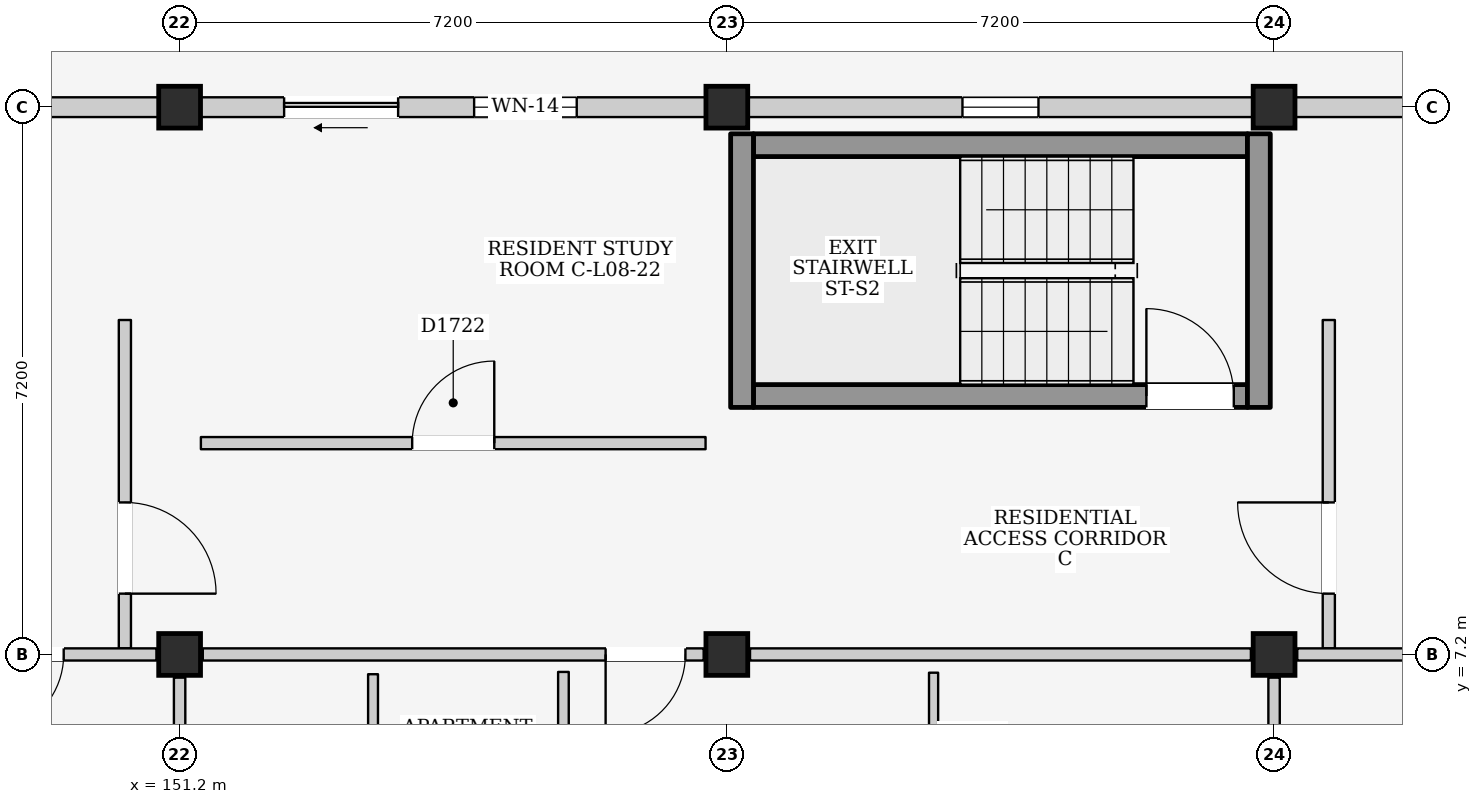
"""IFC4 building model, lengths in metres.
Left out: names, types, materials, properties, quantities, classifications, styles, units other than length and angle.
Written with IfcOpenShell. Run it as: python <this file> out.ifc"""

import sys

from ifc_helpers import new_model, si_unit, direction, frame, frame_2d, origin, origin_2d, place, context, subcontext, project, spatial, rectangle, extrude, element, fill, save


model = new_model("IFC4")
c1 = context("Model", 3, precision=1e-05, world=origin(), true_north=direction((0.0, 1.0)))
c2 = subcontext(c1, "Body", "Model", "MODEL_VIEW")
j1 = project(units=[si_unit("LENGTHUNIT", "METRE"), si_unit("PLANEANGLEUNIT", "RADIAN")], contexts=[c1])
p1 = place(None, origin())
s1 = spatial("IfcSite", under=j1, at=p1, CompositionType="ELEMENT")
p2 = place(p1, origin())
s2 = spatial("IfcBuilding", under=s1, at=p2, CompositionType="ELEMENT")
p3 = place(p2, frame((0.0, 0.0, 28.3)))
s3 = spatial("IfcBuildingStorey", under=s2, at=p3, CompositionType="ELEMENT", Elevation=28.3)
for number, where, z_axis, x_axis in (
    (1, (151.2, 7.2, 0.0), (0.0, 0.0, 1.0), (1.0, 0.0, 0.0)),
    (2, (151.2, 14.4, 0.0), (0.0, 0.0, 1.0), (1.0, 0.0, 0.0)),
    (3, (158.4, 7.2, 0.0), (0.0, 0.0, 1.0), (1.0, 0.0, 0.0)),
    (4, (158.4, 14.4, 0.0), (0.0, 0.0, 1.0), (1.0, 0.0, 0.0)),
    (5, (165.6, 7.2, 0.0), (0.0, 0.0, 1.0), (1.0, 0.0, 0.0)),
    (6, (165.6, 14.4, 0.0), (0.0, 0.0, 1.0), (1.0, 0.0, 0.0)),
):
    element("IfcColumn", number, at=place(p3, frame(where, z_axis=z_axis, x_axis=x_axis)), inside=s3, PredefinedType="COLUMN", context=c2, shape_type="SweptSolid", body=[
        extrude(rectangle(XDim=0.55, YDim=0.55, at=origin_2d()), origin(), (0.0, 0.0, 1.0), 3.2),
    ])
p4 = place(p3, frame((144.275, 14.4, 0.0), z_axis=(0.0, 0.0, 1.0), x_axis=(1.0, 0.0, 0.0)))
e7 = element("IfcWall", 7, at=p4, inside=s3, PredefinedType="ELEMENTEDWALL", context=c2, shape_type="SweptSolid", body=[
    extrude(rectangle(XDim=6.65, YDim=0.26, at=frame_2d((3.325, 0.0))), origin(), (0.0, 0.0, 1.0), 2.335),
])
p5 = place(p4, frame((2.825, 0.0, 1.2)))
e8 = element("IfcOpeningElement", 8, at=p5, cuts=e7, PredefinedType="OPENING", context=c2, shape_type="SweptSolid", body=[
    extrude(rectangle(XDim=1.0, YDim=0.9, at=frame_2d((0.5, 0.45))), frame((0.0, 0.145, 0.0), z_axis=(0.0, -1.0, 0.0), x_axis=(1.0, 0.0, 0.0)), (0.0, 0.0, 1.0), 0.29),
])
p6 = place(p3, frame((151.475, 14.4, 0.0), z_axis=(0.0, 0.0, 1.0), x_axis=(1.0, 0.0, 0.0)))
e9 = element("IfcWall", 9, at=p6, inside=s3, PredefinedType="ELEMENTEDWALL", context=c2, shape_type="SweptSolid", body=[
    extrude(rectangle(XDim=6.65, YDim=0.26, at=frame_2d((3.325, 0.0))), origin(), (0.0, 0.0, 1.0), 2.335),
])
p7 = place(p6, frame((1.1, 0.0, 0.0)))
e10 = element("IfcOpeningElement", 10, at=p7, cuts=e9, PredefinedType="OPENING", context=c2, shape_type="SweptSolid", body=[
    extrude(rectangle(XDim=1.5, YDim=2.12, at=frame_2d((0.75, 1.06))), frame((0.0, 0.145, 0.0), z_axis=(0.0, -1.0, 0.0), x_axis=(1.0, 0.0, 0.0)), (0.0, 0.0, 1.0), 0.29),
])
p8 = place(p6, frame((3.6, 0.0, 0.725)))
e11 = element("IfcOpeningElement", 11, at=p8, cuts=e9, PredefinedType="OPENING", context=c2, shape_type="SweptSolid", body=[
    extrude(rectangle(XDim=1.35, YDim=1.5, at=frame_2d((0.675, 0.75))), frame((0.0, 0.145, 0.0), z_axis=(0.0, -1.0, 0.0), x_axis=(1.0, 0.0, 0.0)), (0.0, 0.0, 1.0), 0.29),
])
p9 = place(p3, frame((158.675, 14.4, 0.0), z_axis=(0.0, 0.0, 1.0), x_axis=(1.0, 0.0, 0.0)))
e12 = element("IfcWall", 12, at=p9, inside=s3, PredefinedType="ELEMENTEDWALL", context=c2, shape_type="SweptSolid", body=[
    extrude(rectangle(XDim=6.65, YDim=0.26, at=frame_2d((3.325, 0.0))), origin(), (0.0, 0.0, 1.0), 2.335),
])
p10 = place(p9, frame((2.825, 0.0, 1.2)))
e13 = element("IfcOpeningElement", 13, at=p10, cuts=e12, PredefinedType="OPENING", context=c2, shape_type="SweptSolid", body=[
    extrude(rectangle(XDim=1.0, YDim=0.9, at=frame_2d((0.5, 0.45))), frame((0.0, 0.145, 0.0), z_axis=(0.0, -1.0, 0.0), x_axis=(1.0, 0.0, 0.0)), (0.0, 0.0, 1.0), 0.29),
])
p11 = place(p3, frame((165.875, 14.4, 0.0), z_axis=(0.0, 0.0, 1.0), x_axis=(1.0, 0.0, 0.0)))
e14 = element("IfcWall", 14, at=p11, inside=s3, PredefinedType="ELEMENTEDWALL", context=c2, shape_type="SweptSolid", body=[
    extrude(rectangle(XDim=6.65, YDim=0.26, at=frame_2d((3.325, 0.0))), origin(), (0.0, 0.0, 1.0), 2.335),
])
p12 = place(p11, frame((2.825, 0.0, 1.2)))
e15 = element("IfcOpeningElement", 15, at=p12, cuts=e14, PredefinedType="OPENING", context=c2, shape_type="SweptSolid", body=[
    extrude(rectangle(XDim=1.0, YDim=0.9, at=frame_2d((0.5, 0.45))), frame((0.0, 0.145, 0.0), z_axis=(0.0, -1.0, 0.0), x_axis=(1.0, 0.0, 0.0)), (0.0, 0.0, 1.0), 0.29),
])
p13 = place(p3, frame((150.48, 7.28, 0.0), z_axis=(0.0, 0.0, 1.0), x_axis=(0.0, 1.0, 0.0)))
e16 = element("IfcWall", 16, at=p13, inside=s3, PredefinedType="PARTITIONING", context=c2, shape_type="SweptSolid", body=[
    extrude(rectangle(XDim=4.32, YDim=0.16, at=frame_2d((2.16, 0.0))), origin(), (0.0, 0.0, 1.0), 2.95),
])
p14 = place(p13, frame((0.72, 0.0, 0.0)))
e17 = element("IfcOpeningElement", 17, at=p14, cuts=e16, PredefinedType="OPENING", context=c2, shape_type="SweptSolid", body=[
    extrude(rectangle(XDim=1.2, YDim=2.2, at=frame_2d((0.6, 1.1))), frame((0.0, 0.095, 0.0), z_axis=(0.0, -1.0, 0.0), x_axis=(1.0, 0.0, 0.0)), (0.0, 0.0, 1.0), 0.19),
])
p15 = place(p3, frame((158.75, 10.6, 0.0), z_axis=(0.0, 0.0, 1.0), x_axis=(1.0, 0.0, 0.0)))
e18 = element("IfcWall", 18, at=p15, inside=s3, PredefinedType="SHEAR", context=c2, shape_type="SweptSolid", body=[
    extrude(rectangle(XDim=6.5, YDim=0.3, at=frame_2d((3.25, 0.0))), origin(), (0.0, 0.0, 1.0), 2.95),
])
p16 = place(p15, frame((5.17, 0.0, 0.0)))
e19 = element("IfcOpeningElement", 19, at=p16, cuts=e18, PredefinedType="OPENING", context=c2, shape_type="SweptSolid", body=[
    extrude(rectangle(XDim=1.15, YDim=2.2, at=frame_2d((0.575, 1.1))), frame((0.0, 0.165, 0.0), z_axis=(0.0, -1.0, 0.0), x_axis=(1.0, 0.0, 0.0)), (0.0, 0.0, 1.0), 0.33),
])
p17 = place(p3, frame((158.75, 13.9, 0.0), z_axis=(0.0, 0.0, 1.0), x_axis=(1.0, 0.0, 0.0)))
e20 = element("IfcWall", 20, at=p17, inside=s3, PredefinedType="SHEAR", context=c2, shape_type="SweptSolid", body=[
    extrude(rectangle(XDim=6.5, YDim=0.3, at=frame_2d((3.25, 0.0))), origin(), (0.0, 0.0, 1.0), 2.95),
])
for number, where, z_axis, x_axis in (
    (21, (158.6, 10.45, 0.0), (0.0, 0.0, 1.0), (0.0, 1.0, 0.0)),
    (22, (165.4, 10.45, 0.0), (0.0, 0.0, 1.0), (0.0, 1.0, 0.0)),
):
    element("IfcWall", number, at=place(p3, frame(where, z_axis=z_axis, x_axis=x_axis)), inside=s3, PredefinedType="SHEAR", context=c2, shape_type="SweptSolid", body=[
        extrude(rectangle(XDim=3.6, YDim=0.3, at=frame_2d((1.8, 0.0))), origin(), (0.0, 0.0, 1.0), 2.95),
    ])
p18 = place(p3, frame((166.32, 7.28, 0.0), z_axis=(0.0, 0.0, 1.0), x_axis=(0.0, 1.0, 0.0)))
e23 = element("IfcWall", 23, at=p18, inside=s3, PredefinedType="PARTITIONING", context=c2, shape_type="SweptSolid", body=[
    extrude(rectangle(XDim=4.32, YDim=0.16, at=frame_2d((2.16, 0.0))), origin(), (0.0, 0.0, 1.0), 2.95),
])
p19 = place(p18, frame((0.72, 0.0, 0.0)))
e24 = element("IfcOpeningElement", 24, at=p19, cuts=e23, PredefinedType="OPENING", context=c2, shape_type="SweptSolid", body=[
    extrude(rectangle(XDim=1.2, YDim=2.2, at=frame_2d((0.6, 1.1))), frame((0.0, 0.095, 0.0), z_axis=(0.0, -1.0, 0.0), x_axis=(1.0, 0.0, 0.0)), (0.0, 0.0, 1.0), 0.19),
])
p20 = place(p3, frame((144.305, 7.2, 0.0), z_axis=(0.0, 0.0, 1.0), x_axis=(1.0, 0.0, 0.0)))
e25 = element("IfcWall", 25, at=p20, inside=s3, PredefinedType="PARTITIONING", context=c2, shape_type="SweptSolid", body=[
    extrude(rectangle(XDim=6.59, YDim=0.16, at=frame_2d((3.295, 0.0))), origin(), (0.0, 0.0, 1.0), 2.335),
])
p21 = place(p20, frame((4.32, 0.0, 0.0)))
e26 = element("IfcOpeningElement", 26, at=p21, cuts=e25, PredefinedType="OPENING", context=c2, shape_type="SweptSolid", body=[
    extrude(rectangle(XDim=1.05, YDim=2.15, at=frame_2d((0.525, 1.075))), frame((0.0, 0.095, 0.0), z_axis=(0.0, -1.0, 0.0), x_axis=(1.0, 0.0, 0.0)), (0.0, 0.0, 1.0), 0.19),
])
p22 = place(p3, frame((151.2, 0.305, 0.0), z_axis=(0.0, 0.0, 1.0), x_axis=(0.0, 1.0, 0.0)))
e27 = element("IfcWall", 27, at=p22, inside=s3, PredefinedType="PARTITIONING", context=c2, shape_type="SweptSolid", body=[
    extrude(rectangle(XDim=6.59, YDim=0.15, at=frame_2d((3.295, 0.0))), origin(), (0.0, 0.0, 1.0), 2.435),
])
p23 = place(p3, frame((151.505, 7.2, 0.0), z_axis=(0.0, 0.0, 1.0), x_axis=(1.0, 0.0, 0.0)))
e28 = element("IfcWall", 28, at=p23, inside=s3, PredefinedType="PARTITIONING", context=c2, shape_type="SweptSolid", body=[
    extrude(rectangle(XDim=6.59, YDim=0.16, at=frame_2d((3.295, 0.0))), origin(), (0.0, 0.0, 1.0), 2.335),
])
p24 = place(p23, frame((5.3, 0.0, 0.0)))
e29 = element("IfcOpeningElement", 29, at=p24, cuts=e28, PredefinedType="OPENING", context=c2, shape_type="SweptSolid", body=[
    extrude(rectangle(XDim=1.05, YDim=2.15, at=frame_2d((0.525, 1.075))), frame((0.0, 0.095, 0.0), z_axis=(0.0, -1.0, 0.0), x_axis=(1.0, 0.0, 0.0)), (0.0, 0.0, 1.0), 0.19),
])
p25 = place(p3, frame((158.705, 7.2, 0.0), z_axis=(0.0, 0.0, 1.0), x_axis=(1.0, 0.0, 0.0)))
e30 = element("IfcWall", 30, at=p25, inside=s3, PredefinedType="PARTITIONING", context=c2, shape_type="SweptSolid", body=[
    extrude(rectangle(XDim=6.59, YDim=0.16, at=frame_2d((3.295, 0.0))), origin(), (0.0, 0.0, 1.0), 2.335),
])
p26 = place(p3, frame((165.6, 0.305, 0.0), z_axis=(0.0, 0.0, 1.0), x_axis=(0.0, 1.0, 0.0)))
e31 = element("IfcWall", 31, at=p26, inside=s3, PredefinedType="PARTITIONING", context=c2, shape_type="SweptSolid", body=[
    extrude(rectangle(XDim=6.59, YDim=0.15, at=frame_2d((3.295, 0.0))), origin(), (0.0, 0.0, 1.0), 2.435),
])
p27 = place(p3, frame((153.745, 3.9, 0.0), z_axis=(0.0, 0.0, 1.0), x_axis=(0.0, 1.0, 0.0)))
e32 = element("IfcWall", 32, at=p27, inside=s3, PredefinedType="PARTITIONING", context=c2, shape_type="SweptSolid", body=[
    extrude(rectangle(XDim=3.04, YDim=0.13, at=frame_2d((1.52, 0.0))), origin(), (0.0, 0.0, 1.0), 2.95),
])
p28 = place(p3, frame((156.25, 3.91, 0.0), z_axis=(0.0, 0.0, 1.0), x_axis=(0.0, 1.0, 0.0)))
e33 = element("IfcWall", 33, at=p28, inside=s3, PredefinedType="PARTITIONING", context=c2, shape_type="SweptSolid", body=[
    extrude(rectangle(XDim=3.06, YDim=0.14, at=frame_2d((1.53, 0.0))), origin(), (0.0, 0.0, 1.0), 2.95),
])
p29 = place(p3, frame((161.12, 3.92, 0.0), z_axis=(0.0, 0.0, 1.0), x_axis=(0.0, 1.0, 0.0)))
e34 = element("IfcWall", 34, at=p29, inside=s3, PredefinedType="PARTITIONING", context=c2, shape_type="SweptSolid", body=[
    extrude(rectangle(XDim=3.04, YDim=0.12, at=frame_2d((1.52, 0.0))), origin(), (0.0, 0.0, 1.0), 2.95),
])
p30 = place(p29, frame((1.04, 0.0, 0.0)))
e35 = element("IfcOpeningElement", 35, at=p30, cuts=e34, PredefinedType="OPENING", context=c2, shape_type="SweptSolid", body=[
    extrude(rectangle(XDim=0.96, YDim=2.15, at=frame_2d((0.48, 1.075))), frame((0.0, 0.075, 0.0), z_axis=(0.0, -1.0, 0.0), x_axis=(1.0, 0.0, 0.0)), (0.0, 0.0, 1.0), 0.15),
])
p31 = place(p3, frame((165.905, 7.2, 0.0), z_axis=(0.0, 0.0, 1.0), x_axis=(1.0, 0.0, 0.0)))
e36 = element("IfcWall", 36, at=p31, inside=s3, PredefinedType="PARTITIONING", context=c2, shape_type="SweptSolid", body=[
    extrude(rectangle(XDim=6.59, YDim=0.16, at=frame_2d((3.295, 0.0))), origin(), (0.0, 0.0, 1.0), 2.335),
])
p32 = place(p31, frame((4.32, 0.0, 0.0)))
e37 = element("IfcOpeningElement", 37, at=p32, cuts=e36, PredefinedType="OPENING", context=c2, shape_type="SweptSolid", body=[
    extrude(rectangle(XDim=1.05, YDim=2.15, at=frame_2d((0.525, 1.075))), frame((0.0, 0.095, 0.0), z_axis=(0.0, -1.0, 0.0), x_axis=(1.0, 0.0, 0.0)), (0.0, 0.0, 1.0), 0.19),
])
p33 = place(p3, frame((151.48, 9.98, 0.0), z_axis=(0.0, 0.0, 1.0), x_axis=(1.0, 0.0, 0.0)))
e38 = element("IfcWall", 38, at=p33, inside=s3, PredefinedType="PARTITIONING", context=c2, shape_type="SweptSolid", body=[
    extrude(rectangle(XDim=6.64, YDim=0.16, at=frame_2d((3.32, 0.0))), origin(), (0.0, 0.0, 1.0), 2.95),
])
p34 = place(p33, frame((2.78, 0.0, 0.0)))
e39 = element("IfcOpeningElement", 39, at=p34, cuts=e38, PredefinedType="OPENING", context=c2, shape_type="SweptSolid", body=[
    extrude(rectangle(XDim=1.08, YDim=2.22, at=frame_2d((0.54, 1.11))), frame((0.0, 0.095, 0.0), z_axis=(0.0, -1.0, 0.0), x_axis=(1.0, 0.0, 0.0)), (0.0, 0.0, 1.0), 0.19),
])
p35 = place(p7, frame((1.5, 0.0, 0.0), z_axis=(0.0, 0.0, 1.0), x_axis=(-1.0, 0.0, 0.0)))
e40 = element("IfcDoor", 40, at=p35, inside=s3, OperationType="SLIDING_TO_LEFT", PredefinedType="DOOR", context=c2, shape_type="SweptSolid", body=[
    extrude(rectangle(XDim=1.5, YDim=2.12, at=frame_2d((0.75, 1.06))), frame((0.0, 0.025, 0.0), z_axis=(0.0, -1.0, 0.0), x_axis=(1.0, 0.0, 0.0)), (0.0, 0.0, 1.0), 0.05),
])
fill(e10, e40)
p36 = place(p8, origin())
e41 = element("IfcWindow", 41, at=p36, inside=s3, PartitioningType="SINGLE_PANEL", PredefinedType="WINDOW", context=c2, shape_type="SweptSolid", body=[
    extrude(rectangle(XDim=1.35, YDim=1.5, at=frame_2d((0.675, 0.75))), frame((0.0, 0.03, 0.0), z_axis=(0.0, -1.0, 0.0), x_axis=(1.0, 0.0, 0.0)), (0.0, 0.0, 1.0), 0.06),
])
fill(e11, e41)
p37 = place(p10, origin())
e42 = element("IfcWindow", 42, at=p37, inside=s3, PartitioningType="SINGLE_PANEL", PredefinedType="WINDOW", context=c2, shape_type="SweptSolid", body=[
    extrude(rectangle(XDim=1.0, YDim=0.9, at=frame_2d((0.5, 0.45))), frame((0.0, 0.03, 0.0), z_axis=(0.0, -1.0, 0.0), x_axis=(1.0, 0.0, 0.0)), (0.0, 0.0, 1.0), 0.06),
])
fill(e13, e42)
p38 = place(p14, frame((1.2, 0.0, 0.0), z_axis=(0.0, 0.0, 1.0), x_axis=(-1.0, 0.0, 0.0)))
e43 = element("IfcDoor", 43, at=p38, inside=s3, OperationType="SINGLE_SWING_RIGHT", PredefinedType="DOOR", context=c2, shape_type="SweptSolid", body=[
    extrude(rectangle(XDim=1.2, YDim=2.2, at=frame_2d((0.6, 1.1))), frame((0.0, 0.025, 0.0), z_axis=(0.0, -1.0, 0.0), x_axis=(1.0, 0.0, 0.0)), (0.0, 0.0, 1.0), 0.05),
])
fill(e17, e43)
p39 = place(p16, origin())
e44 = element("IfcDoor", 44, at=p39, inside=s3, OperationType="SINGLE_SWING_LEFT", PredefinedType="DOOR", context=c2, shape_type="SweptSolid", body=[
    extrude(rectangle(XDim=1.15, YDim=2.2, at=frame_2d((0.575, 1.1))), frame((0.0, 0.025, 0.0), z_axis=(0.0, -1.0, 0.0), x_axis=(1.0, 0.0, 0.0)), (0.0, 0.0, 1.0), 0.05),
])
fill(e19, e44)
p40 = place(p19, origin())
e45 = element("IfcDoor", 45, at=p40, inside=s3, OperationType="SINGLE_SWING_RIGHT", PredefinedType="DOOR", context=c2, shape_type="SweptSolid", body=[
    extrude(rectangle(XDim=1.2, YDim=2.2, at=frame_2d((0.6, 1.1))), frame((0.0, 0.025, 0.0), z_axis=(0.0, -1.0, 0.0), x_axis=(1.0, 0.0, 0.0)), (0.0, 0.0, 1.0), 0.05),
])
fill(e24, e45)
p41 = place(p21, frame((1.05, 0.0, 0.0), z_axis=(0.0, 0.0, 1.0), x_axis=(-1.0, 0.0, 0.0)))
e46 = element("IfcDoor", 46, at=p41, inside=s3, OperationType="SINGLE_SWING_RIGHT", PredefinedType="DOOR", context=c2, shape_type="SweptSolid", body=[
    extrude(rectangle(XDim=1.05, YDim=2.15, at=frame_2d((0.525, 1.075))), frame((0.0, 0.025, 0.0), z_axis=(0.0, -1.0, 0.0), x_axis=(1.0, 0.0, 0.0)), (0.0, 0.0, 1.0), 0.05),
])
fill(e26, e46)
p42 = place(p24, frame((1.05, 0.0, 0.0), z_axis=(0.0, 0.0, 1.0), x_axis=(-1.0, 0.0, 0.0)))
e47 = element("IfcDoor", 47, at=p42, inside=s3, OperationType="SINGLE_SWING_RIGHT", PredefinedType="DOOR", context=c2, shape_type="SweptSolid", body=[
    extrude(rectangle(XDim=1.05, YDim=2.15, at=frame_2d((0.525, 1.075))), frame((0.0, 0.025, 0.0), z_axis=(0.0, -1.0, 0.0), x_axis=(1.0, 0.0, 0.0)), (0.0, 0.0, 1.0), 0.05),
])
fill(e29, e47)
p43 = place(p34, origin())
e48 = element("IfcDoor", 48, at=p43, inside=s3, OperationType="SINGLE_SWING_RIGHT", PredefinedType="DOOR", context=c2, shape_type="SweptSolid", body=[
    extrude(rectangle(XDim=1.08, YDim=2.22, at=frame_2d((0.54, 1.11))), frame((0.0, 0.025, 0.0), z_axis=(0.0, -1.0, 0.0), x_axis=(1.0, 0.0, 0.0)), (0.0, 0.0, 1.0), 0.05),
])
fill(e39, e48)
save(model, sys.argv[1])
